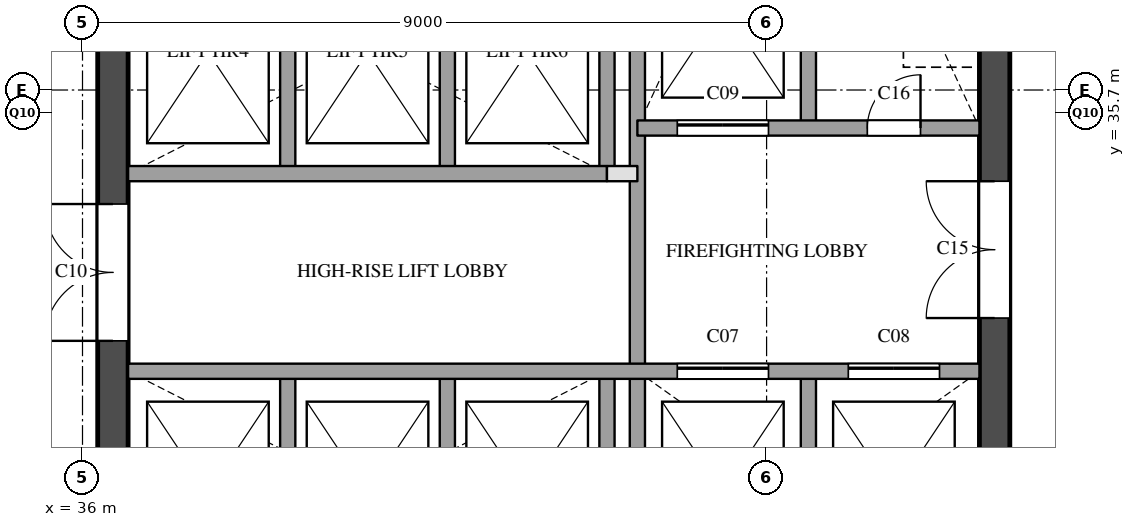
"""IFC4 building model, lengths in metres.
Left out: names, types, materials, properties, quantities, classifications, styles, units other than length and angle.
Written with IfcOpenShell. Run it as: python <this file> out.ifc"""

import sys

from ifc_helpers import new_model, si_unit, direction, frame, frame_2d, origin, place, context, subcontext, project, spatial, rectangle, extrude, element, fill, save


model = new_model("IFC4")
c1 = context("Model", 3, precision=1e-05, world=origin(), true_north=direction((0.0, 1.0)))
c2 = subcontext(c1, "Body", "Model", "MODEL_VIEW")
j1 = project(units=[si_unit("LENGTHUNIT", "METRE"), si_unit("PLANEANGLEUNIT", "RADIAN")], contexts=[c1])
p1 = place(None, origin())
s1 = spatial("IfcSite", under=j1, at=p1, CompositionType="ELEMENT")
p2 = place(p1, origin())
s2 = spatial("IfcBuilding", under=s1, at=p2, CompositionType="ELEMENT")
p3 = place(p2, frame((0.0, 0.0, 238.4)))
s3 = spatial("IfcBuildingStorey", under=s2, at=p3, CompositionType="ELEMENT", Elevation=238.4)
p4 = place(p3, frame((36.4, 29.1, 0.0), z_axis=(0.0, 0.0, 1.0), x_axis=(0.0, 1.0, 0.0)))
e1 = element("IfcWall", 1, at=p4, inside=s3, PredefinedType="SHEAR", context=c2, shape_type="SweptSolid", body=[
    extrude(rectangle(XDim=20.3, YDim=0.4, at=frame_2d((10.15, 0.0))), origin(), (0.0, 0.0, 1.0), 3.6),
])
p5 = place(p4, frame((3.6, 0.0, 0.0)))
e2 = element("IfcOpeningElement", 2, at=p5, cuts=e1, PredefinedType="OPENING", context=c2, shape_type="SweptSolid", body=[
    extrude(rectangle(XDim=1.8, YDim=2.1, at=frame_2d((0.9, 1.05))), frame((0.0, 0.21, 0.0), z_axis=(0.0, -1.0, 0.0), x_axis=(1.0, 0.0, 0.0)), (0.0, 0.0, 1.0), 0.42),
])
p6 = place(p4, frame((16.4, 0.0, 0.0)))
e3 = element("IfcOpeningElement", 3, at=p6, cuts=e1, PredefinedType="OPENING", context=c2, shape_type="SweptSolid", body=[
    extrude(rectangle(XDim=1.0, YDim=2.1, at=frame_2d((0.5, 1.05))), frame((0.0, 0.21, 0.0), z_axis=(0.0, -1.0, 0.0), x_axis=(1.0, 0.0, 0.0)), (0.0, 0.0, 1.0), 0.42),
])
p7 = place(p3, frame((48.0, 29.1, 0.0), z_axis=(0.0, 0.0, 1.0), x_axis=(0.0, 1.0, 0.0)))
e4 = element("IfcWall", 4, at=p7, inside=s3, PredefinedType="SHEAR", context=c2, shape_type="SweptSolid", body=[
    extrude(rectangle(XDim=20.3, YDim=0.4, at=frame_2d((10.15, 0.0))), origin(), (0.0, 0.0, 1.0), 3.6),
])
p8 = place(p7, frame((12.5, 0.0, 0.0)))
e5 = element("IfcOpeningElement", 5, at=p8, cuts=e4, PredefinedType="OPENING", context=c2, shape_type="SweptSolid", body=[
    extrude(rectangle(XDim=0.7, YDim=2.1, at=frame_2d((0.35, 1.05))), frame((0.0, 0.21, 0.0), z_axis=(0.0, -1.0, 0.0), x_axis=(1.0, 0.0, 0.0)), (0.0, 0.0, 1.0), 0.42),
])
p9 = place(p7, frame((3.9, 0.0, 0.0)))
e6 = element("IfcOpeningElement", 6, at=p9, cuts=e4, PredefinedType="OPENING", context=c2, shape_type="SweptSolid", body=[
    extrude(rectangle(XDim=1.8, YDim=2.1, at=frame_2d((0.9, 1.05))), frame((0.0, 0.21, 0.0), z_axis=(0.0, -1.0, 0.0), x_axis=(1.0, 0.0, 0.0)), (0.0, 0.0, 1.0), 0.42),
])
p10 = place(p3, frame((38.7, 29.1, 0.0), z_axis=(0.0, 0.0, 1.0), x_axis=(0.0, 1.0, 0.0)))
e7 = element("IfcWall", 7, at=p10, inside=s3, PredefinedType="SOLIDWALL", context=c2, shape_type="SweptSolid", body=[
    extrude(rectangle(XDim=3.2, YDim=0.2, at=frame_2d((1.6, 0.0))), origin(), (0.0, 0.0, 1.0), 3.6),
])
p11 = place(p3, frame((38.7, 34.9, 0.0), z_axis=(0.0, 0.0, 1.0), x_axis=(0.0, 1.0, 0.0)))
e8 = element("IfcWall", 8, at=p11, inside=s3, PredefinedType="SOLIDWALL", context=c2, shape_type="SweptSolid", body=[
    extrude(rectangle(XDim=3.2, YDim=0.2, at=frame_2d((1.6, 0.0))), origin(), (0.0, 0.0, 1.0), 3.6),
])
p12 = place(p3, frame((40.8, 29.1, 0.0), z_axis=(0.0, 0.0, 1.0), x_axis=(0.0, 1.0, 0.0)))
e9 = element("IfcWall", 9, at=p12, inside=s3, PredefinedType="SOLIDWALL", context=c2, shape_type="SweptSolid", body=[
    extrude(rectangle(XDim=3.2, YDim=0.2, at=frame_2d((1.6, 0.0))), origin(), (0.0, 0.0, 1.0), 3.6),
])
p13 = place(p3, frame((40.8, 34.9, 0.0), z_axis=(0.0, 0.0, 1.0), x_axis=(0.0, 1.0, 0.0)))
e10 = element("IfcWall", 10, at=p13, inside=s3, PredefinedType="SOLIDWALL", context=c2, shape_type="SweptSolid", body=[
    extrude(rectangle(XDim=3.2, YDim=0.2, at=frame_2d((1.6, 0.0))), origin(), (0.0, 0.0, 1.0), 3.6),
])
p14 = place(p3, frame((42.9, 29.1, 0.0), z_axis=(0.0, 0.0, 1.0), x_axis=(0.0, 1.0, 0.0)))
e11 = element("IfcWall", 11, at=p14, inside=s3, PredefinedType="SOLIDWALL", context=c2, shape_type="SweptSolid", body=[
    extrude(rectangle(XDim=3.2, YDim=0.2, at=frame_2d((1.6, 0.0))), origin(), (0.0, 0.0, 1.0), 3.6),
])
p15 = place(p3, frame((42.9, 34.9, 0.0), z_axis=(0.0, 0.0, 1.0), x_axis=(0.0, 1.0, 0.0)))
e12 = element("IfcWall", 12, at=p15, inside=s3, PredefinedType="SOLIDWALL", context=c2, shape_type="SweptSolid", body=[
    extrude(rectangle(XDim=3.2, YDim=0.2, at=frame_2d((1.6, 0.0))), origin(), (0.0, 0.0, 1.0), 3.6),
])
p16 = place(p3, frame((43.3, 29.1, 0.0), z_axis=(0.0, 0.0, 1.0), x_axis=(0.0, 1.0, 0.0)))
e13 = element("IfcWall", 13, at=p16, inside=s3, PredefinedType="SOLIDWALL", context=c2, shape_type="SweptSolid", body=[
    extrude(rectangle(XDim=9.9, YDim=0.2, at=frame_2d((4.95, 0.0))), origin(), (0.0, 0.0, 1.0), 3.6),
])
for number, where, z_axis, x_axis in (
    (14, (45.55, 29.1, 0.0), (0.0, 0.0, 1.0), (0.0, 1.0, 0.0)),
    (15, (45.55, 35.5, 0.0), (0.0, 0.0, 1.0), (0.0, 1.0, 0.0)),
):
    element("IfcWall", number, at=place(p3, frame(where, z_axis=z_axis, x_axis=x_axis)), inside=s3, PredefinedType="SOLIDWALL", context=c2, shape_type="SweptSolid", body=[
        extrude(rectangle(XDim=3.2, YDim=0.2, at=frame_2d((1.6, 0.0))), origin(), (0.0, 0.0, 1.0), 3.6),
    ])
p17 = place(p3, frame((36.6, 32.3, 0.0), z_axis=(0.0, 0.0, 1.0), x_axis=(1.0, 0.0, 0.0)))
e16 = element("IfcWall", 16, at=p17, inside=s3, PredefinedType="SOLIDWALL", context=c2, shape_type="SweptSolid", body=[
    extrude(rectangle(XDim=11.2, YDim=0.2, at=frame_2d((5.6, 0.0))), origin(), (0.0, 0.0, 1.0), 3.6),
])
p18 = place(p17, frame((7.225, 0.0, 0.0)))
e17 = element("IfcOpeningElement", 17, at=p18, cuts=e16, PredefinedType="OPENING", context=c2, shape_type="SweptSolid", body=[
    extrude(rectangle(XDim=1.2, YDim=2.1, at=frame_2d((0.6, 1.05))), frame((0.0, 0.11, 0.0), z_axis=(0.0, -1.0, 0.0), x_axis=(1.0, 0.0, 0.0)), (0.0, 0.0, 1.0), 0.22),
])
p19 = place(p17, frame((9.475, 0.0, 0.0)))
e18 = element("IfcOpeningElement", 18, at=p19, cuts=e16, PredefinedType="OPENING", context=c2, shape_type="SweptSolid", body=[
    extrude(rectangle(XDim=1.2, YDim=2.1, at=frame_2d((0.6, 1.05))), frame((0.0, 0.11, 0.0), z_axis=(0.0, -1.0, 0.0), x_axis=(1.0, 0.0, 0.0)), (0.0, 0.0, 1.0), 0.22),
])
p20 = place(p3, frame((42.9, 34.9, 0.0), z_axis=(0.0, 0.0, 1.0), x_axis=(1.0, 0.0, 0.0)))
e19 = element("IfcWall", 19, at=p20, inside=s3, PredefinedType="PARTITIONING", context=c2, shape_type="SweptSolid", body=[
    extrude(rectangle(XDim=0.4, YDim=0.2, at=frame_2d((0.2, 0.0))), origin(), (0.0, 0.0, 1.0), 3.6),
])
p21 = place(p3, frame((36.6, 34.9, 0.0), z_axis=(0.0, 0.0, 1.0), x_axis=(1.0, 0.0, 0.0)))
e20 = element("IfcWall", 20, at=p21, inside=s3, PredefinedType="SOLIDWALL", context=c2, shape_type="SweptSolid", body=[
    extrude(rectangle(XDim=6.3, YDim=0.2, at=frame_2d((3.15, 0.0))), origin(), (0.0, 0.0, 1.0), 3.6),
])
p22 = place(p3, frame((43.3, 35.5, 0.0), z_axis=(0.0, 0.0, 1.0), x_axis=(1.0, 0.0, 0.0)))
e21 = element("IfcWall", 21, at=p22, inside=s3, PredefinedType="SOLIDWALL", context=c2, shape_type="SweptSolid", body=[
    extrude(rectangle(XDim=4.5, YDim=0.2, at=frame_2d((2.25, 0.0))), origin(), (0.0, 0.0, 1.0), 3.6),
])
p23 = place(p22, frame((0.525, 0.0, 0.0)))
e22 = element("IfcOpeningElement", 22, at=p23, cuts=e21, PredefinedType="OPENING", context=c2, shape_type="SweptSolid", body=[
    extrude(rectangle(XDim=1.2, YDim=2.1, at=frame_2d((0.6, 1.05))), frame((0.0, 0.11, 0.0), z_axis=(0.0, -1.0, 0.0), x_axis=(1.0, 0.0, 0.0)), (0.0, 0.0, 1.0), 0.22),
])
p24 = place(p22, frame((3.025, 0.0, 0.0)))
e23 = element("IfcOpeningElement", 23, at=p24, cuts=e21, PredefinedType="OPENING", context=c2, shape_type="SweptSolid", body=[
    extrude(rectangle(XDim=0.7, YDim=2.1, at=frame_2d((0.35, 1.05))), frame((0.0, 0.11, 0.0), z_axis=(0.0, -1.0, 0.0), x_axis=(1.0, 0.0, 0.0)), (0.0, 0.0, 1.0), 0.22),
])
p25 = place(p18, origin())
e24 = element("IfcDoor", 24, at=p25, inside=s3, OperationType="SLIDING_TO_LEFT", PredefinedType="DOOR", context=c2, shape_type="SweptSolid", body=[
    extrude(rectangle(XDim=1.2, YDim=2.1, at=frame_2d((0.6, 1.05))), frame((0.0, 0.025, 0.0), z_axis=(0.0, -1.0, 0.0), x_axis=(1.0, 0.0, 0.0)), (0.0, 0.0, 1.0), 0.05),
])
fill(e17, e24)
p26 = place(p19, origin())
e25 = element("IfcDoor", 25, at=p26, inside=s3, OperationType="SLIDING_TO_LEFT", PredefinedType="DOOR", context=c2, shape_type="SweptSolid", body=[
    extrude(rectangle(XDim=1.2, YDim=2.1, at=frame_2d((0.6, 1.05))), frame((0.0, 0.025, 0.0), z_axis=(0.0, -1.0, 0.0), x_axis=(1.0, 0.0, 0.0)), (0.0, 0.0, 1.0), 0.05),
])
fill(e18, e25)
p27 = place(p23, origin())
e26 = element("IfcDoor", 26, at=p27, inside=s3, OperationType="SLIDING_TO_LEFT", PredefinedType="DOOR", context=c2, shape_type="SweptSolid", body=[
    extrude(rectangle(XDim=1.2, YDim=2.1, at=frame_2d((0.6, 1.05))), frame((0.0, 0.025, 0.0), z_axis=(0.0, -1.0, 0.0), x_axis=(1.0, 0.0, 0.0)), (0.0, 0.0, 1.0), 0.05),
])
fill(e22, e26)
p28 = place(p5, origin())
e27 = element("IfcDoor", 27, at=p28, inside=s3, OperationType="DOUBLE_DOOR_SINGLE_SWING", PredefinedType="DOOR", context=c2, shape_type="SweptSolid", body=[
    extrude(rectangle(XDim=1.8, YDim=2.1, at=frame_2d((0.9, 1.05))), frame((0.0, 0.025, 0.0), z_axis=(0.0, -1.0, 0.0), x_axis=(1.0, 0.0, 0.0)), (0.0, 0.0, 1.0), 0.05),
])
fill(e2, e27)
p29 = place(p9, origin())
e28 = element("IfcDoor", 28, at=p29, inside=s3, OperationType="DOUBLE_DOOR_SINGLE_SWING", PredefinedType="DOOR", context=c2, shape_type="SweptSolid", body=[
    extrude(rectangle(XDim=1.8, YDim=2.1, at=frame_2d((0.9, 1.05))), frame((0.0, 0.025, 0.0), z_axis=(0.0, -1.0, 0.0), x_axis=(1.0, 0.0, 0.0)), (0.0, 0.0, 1.0), 0.05),
])
fill(e6, e28)
p30 = place(p24, origin())
e29 = element("IfcDoor", 29, at=p30, inside=s3, OperationType="SINGLE_SWING_RIGHT", PredefinedType="DOOR", context=c2, shape_type="SweptSolid", body=[
    extrude(rectangle(XDim=0.7, YDim=2.1, at=frame_2d((0.35, 1.05))), frame((0.0, 0.025, 0.0), z_axis=(0.0, -1.0, 0.0), x_axis=(1.0, 0.0, 0.0)), (0.0, 0.0, 1.0), 0.05),
])
fill(e23, e29)
save(model, sys.argv[1])
